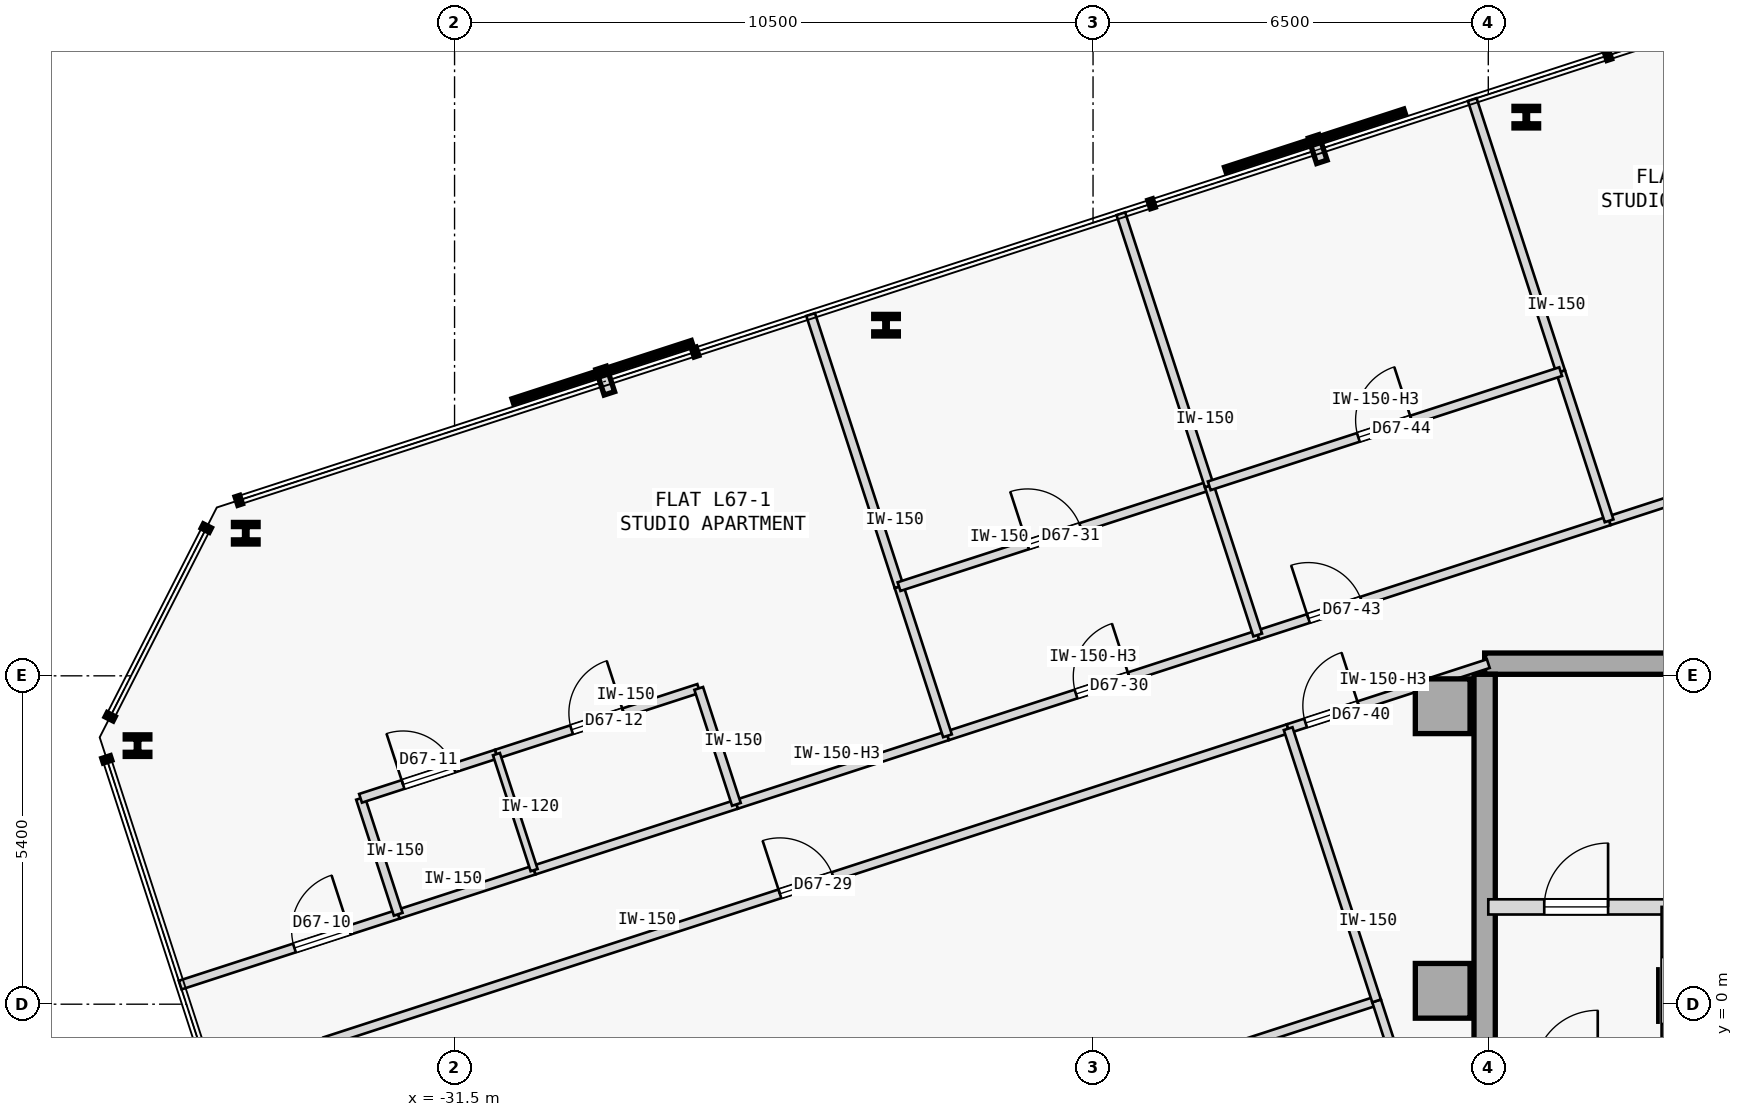
"""IFC4 building model, lengths in metres.
Left out: names, types, materials, properties, quantities, classifications, styles, units other than length and angle.
Written with IfcOpenShell. Run it as: python <this file> out.ifc"""

import sys

from ifc_helpers import new_model, si_unit, direction, frame, frame_2d, origin, origin_2d, place, context, subcontext, project, spatial, rectangle, i_section, extrude, element, fill, save


model = new_model("IFC4")
c1 = context("Model", 3, precision=1e-05, world=origin(), true_north=direction((0.0, 1.0)))
c2 = subcontext(c1, "Body", "Model", "MODEL_VIEW")
j1 = project(units=[si_unit("LENGTHUNIT", "METRE"), si_unit("PLANEANGLEUNIT", "RADIAN")], contexts=[c1])
p1 = place(None, origin())
s1 = spatial("IfcSite", under=j1, at=p1, CompositionType="ELEMENT")
p2 = place(p1, origin())
s2 = spatial("IfcBuilding", under=s1, at=p2, CompositionType="ELEMENT")
p3 = place(p2, frame((0.0, 0.0, 251.1)))
s3 = spatial("IfcBuildingStorey", under=s2, at=p3, CompositionType="ELEMENT", Elevation=251.1)
for number, where, z_axis, x_axis in (
    (1, (-15.25, 4.9, 0.0), (0.0, 0.0, 1.0), (1.0, 0.0, 0.0)),
    (2, (-15.25, 0.22, 0.0), (0.0, 0.0, 1.0), (1.0, 0.0, 0.0)),
):
    element("IfcColumn", number, at=place(p3, frame(where, z_axis=z_axis, x_axis=x_axis)), inside=s3, PredefinedType="COLUMN", context=c2, shape_type="SweptSolid", body=[
        extrude(rectangle(XDim=0.9, YDim=0.9, at=origin_2d()), origin(), (0.0, 0.0, 1.0), 3.35),
    ])
p4 = place(p3, frame((-14.56, 5.6, 0.0), z_axis=(0.0, 0.0, 1.0), x_axis=(1.0, 0.0, 0.0)))
e3 = element("IfcWall", 3, at=p4, inside=s3, PredefinedType="SHEAR", context=c2, shape_type="SweptSolid", body=[
    extrude(rectangle(XDim=11.41, YDim=0.35, at=frame_2d((5.705, 0.0))), origin(), (0.0, 0.0, 1.0), 2.95),
])
p5 = place(p3, frame((-14.56, -5.425, 0.0), z_axis=(0.0, 0.0, 1.0), x_axis=(0.0, 1.0, 0.0)))
e4 = element("IfcWall", 4, at=p5, inside=s3, PredefinedType="SHEAR", context=c2, shape_type="SweptSolid", body=[
    extrude(rectangle(XDim=10.85, YDim=0.35, at=frame_2d((5.425, 0.0))), origin(), (0.0, 0.0, 1.0), 2.95),
])
for number, where, z_axis, x_axis in (
    (5, (-13.875, 14.587, 0.0), (0.0, 0.0, 1.0), (1.0, 0.0, 0.0)),
    (6, (-24.404, 11.166, 0.0), (0.0, 0.0, 1.0), (1.0, 0.0, 0.0)),
    (7, (-34.934, 7.745, 0.0), (0.0, 0.0, 1.0), (1.0, 0.0, 0.0)),
    (8, (-36.713, 4.252, 0.0), (0.0, 0.0, 1.0), (1.0, 0.0, 0.0)),
):
    element("IfcColumn", number, at=place(p3, frame(where, z_axis=z_axis, x_axis=x_axis)), inside=s3, PredefinedType="COLUMN", context=c2, shape_type="SweptSolid", body=[
        extrude(i_section(OverallWidth=0.405, OverallDepth=0.355, WebThickness=0.042, FlangeThickness=0.068, FilletRadius=0.015, at=origin_2d()), origin(), (0.0, 0.0, 1.0), 3.35),
    ])
p6 = place(p3, frame((-14.5, 1.6, 0.0), z_axis=(0.0, 0.0, 1.0), x_axis=(1.0, 0.0, 0.0)))
e9 = element("IfcWall", 9, at=p6, inside=s3, PredefinedType="STANDARD", context=c2, shape_type="SweptSolid", body=[
    extrude(rectangle(XDim=3.6, YDim=0.25, at=frame_2d((1.8, 0.0))), origin(), (0.0, 0.0, 1.0), 2.95),
])
p7 = place(p6, frame((0.92, 0.0, 0.0)))
e10 = element("IfcOpeningElement", 10, at=p7, cuts=e9, PredefinedType="OPENING", context=c2, shape_type="SweptSolid", body=[
    extrude(rectangle(XDim=1.05, YDim=2.15, at=frame_2d((0.525, 1.075))), frame((0.0, 0.135, 0.0), z_axis=(0.0, -1.0, 0.0), x_axis=(1.0, 0.0, 0.0)), (0.0, 0.0, 1.0), 0.27),
])
p8 = place(p3, frame((-11.55, -1.15, 0.0), z_axis=(0.0, 0.0, 1.0), x_axis=(0.0, 1.0, 0.0)))
e11 = element("IfcWall", 11, at=p8, inside=s3, PredefinedType="STANDARD", context=c2, shape_type="SweptSolid", body=[
    extrude(rectangle(XDim=2.75, YDim=0.2, at=frame_2d((1.375, 0.0))), origin(), (0.0, 0.0, 1.0), 2.95),
])
p9 = place(p8, frame((0.825, 0.0, 0.0)))
e12 = element("IfcOpeningElement", 12, at=p9, cuts=e11, PredefinedType="OPENING", context=c2, shape_type="SweptSolid", body=[
    extrude(rectangle(XDim=1.1, YDim=2.15, at=frame_2d((0.55, 1.075))), frame((0.0, 0.11, 0.0), z_axis=(0.0, -1.0, 0.0), x_axis=(1.0, 0.0, 0.0)), (0.0, 0.0, 1.0), 0.22),
])
p10 = place(p3, frame((-36.012, 0.314, 0.0), z_axis=(0.0, 0.0, 1.0), x_axis=(0.951071182868, 0.308971851659, 0.0)))
e13 = element("IfcWall", 13, at=p10, inside=s3, PredefinedType="PARTITIONING", context=c2, shape_type="SweptSolid", body=[
    extrude(rectangle(XDim=3.77, YDim=0.15, at=frame_2d((1.885, 0.0))), origin(), (0.0, 0.0, 1.0), 2.95),
])
p11 = place(p10, frame((1.976, 0.0, 0.0)))
e14 = element("IfcOpeningElement", 14, at=p11, cuts=e13, PredefinedType="OPENING", context=c2, shape_type="SweptSolid", body=[
    extrude(rectangle(XDim=0.95, YDim=2.15, at=frame_2d((0.475, 1.075))), frame((0.0, 0.085, 0.0), z_axis=(0.0, -1.0, 0.0), x_axis=(1.0, 0.0, 0.0)), (0.0, 0.0, 1.0), 0.17),
])
p12 = place(p3, frame((-26.865, 3.286, 0.0), z_axis=(0.0, 0.0, 1.0), x_axis=(0.951057168147, 0.309014988174, 0.0)))
e15 = element("IfcWall", 15, at=p12, inside=s3, PredefinedType="PARTITIONING", context=c2, shape_type="SweptSolid", body=[
    extrude(rectangle(XDim=3.65, YDim=0.15, at=frame_2d((1.825, 0.0))), origin(), (0.0, 0.0, 1.0), 2.17),
])
p13 = place(p3, frame((-32.427, 1.479, 0.0), z_axis=(0.0, 0.0, 1.0), x_axis=(0.951045519245, 0.309050837767, 0.0)))
e16 = element("IfcWall", 16, at=p13, inside=s3, PredefinedType="PARTITIONING", context=c2, shape_type="SweptSolid", body=[
    extrude(rectangle(XDim=2.35, YDim=0.15, at=frame_2d((1.175, 0.0))), origin(), (0.0, 0.0, 1.0), 2.95),
])
p14 = place(p3, frame((-30.192, 2.205, 0.0), z_axis=(0.0, 0.0, 1.0), x_axis=(0.951063814176, 0.308994532905, 0.0)))
e17 = element("IfcWall", 17, at=p14, inside=s3, PredefinedType="PARTITIONING", context=c2, shape_type="SweptSolid", body=[
    extrude(rectangle(XDim=3.498, YDim=0.15, at=frame_2d((1.749, 0.0))), origin(), (0.0, 0.0, 1.0), 2.95),
])
p15 = place(p3, frame((-12.513, 7.949, 0.0), z_axis=(0.0, 0.0, 1.0), x_axis=(0.951050780541, 0.309034646652, 0.0)))
e18 = element("IfcWall", 18, at=p15, inside=s3, PredefinedType="PARTITIONING", context=c2, shape_type="SweptSolid", body=[
    extrude(rectangle(XDim=3.65, YDim=0.15, at=frame_2d((1.825, 0.0))), origin(), (0.0, 0.0, 1.0), 2.95),
])
p16 = place(p3, frame((-33.633, -0.616, 0.0), z_axis=(0.0, 0.0, 1.0), x_axis=(0.951058192995, 0.309011833974, 0.0)))
e19 = element("IfcWall", 19, at=p16, inside=s3, PredefinedType="PARTITIONING", context=c2, shape_type="SweptSolid", body=[
    extrude(rectangle(XDim=16.657, YDim=0.15, at=frame_2d((8.329, 0.0))), origin(), (0.0, 0.0, 1.0), 2.95),
])
p17 = place(p16, frame((7.868, 0.0, 0.0)))
e20 = element("IfcOpeningElement", 20, at=p17, cuts=e19, PredefinedType="OPENING", context=c2, shape_type="SweptSolid", body=[
    extrude(rectangle(XDim=0.92, YDim=2.15, at=frame_2d((0.46, 1.075))), frame((0.0, 0.085, 0.0), z_axis=(0.0, -1.0, 0.0), x_axis=(1.0, 0.0, 0.0)), (0.0, 0.0, 1.0), 0.17),
])
p18 = place(p3, frame((-23.394, 4.414, 0.0), z_axis=(0.0, 0.0, 1.0), x_axis=(0.951050121956, 0.309036673434, 0.0)))
e21 = element("IfcWall", 21, at=p18, inside=s3, PredefinedType="PARTITIONING", context=c2, shape_type="SweptSolid", body=[
    extrude(rectangle(XDim=5.364, YDim=0.15, at=frame_2d((2.682, 0.0))), origin(), (0.0, 0.0, 1.0), 2.17),
])
p19 = place(p18, frame((2.222, 0.0, 0.0)))
e22 = element("IfcOpeningElement", 22, at=p19, cuts=e21, PredefinedType="OPENING", context=c2, shape_type="SweptSolid", body=[
    extrude(rectangle(XDim=0.92, YDim=2.15, at=frame_2d((0.46, 1.075))), frame((0.0, 0.085, 0.0), z_axis=(0.0, -1.0, 0.0), x_axis=(1.0, 0.0, 0.0)), (0.0, 0.0, 1.0), 0.17),
])
p20 = place(p3, frame((-17.792, 4.531, 0.0), z_axis=(0.0, 0.0, 1.0), x_axis=(0.951047546178, 0.309044600193, 0.0)))
e23 = element("IfcWall", 23, at=p20, inside=s3, PredefinedType="PARTITIONING", context=c2, shape_type="SweptSolid", body=[
    extrude(rectangle(XDim=3.461, YDim=0.15, at=frame_2d((1.73, 0.0))), origin(), (0.0, 0.0, 1.0), 2.17),
])
p21 = place(p20, frame((0.302, 0.0, 0.0)))
e24 = element("IfcOpeningElement", 24, at=p21, cuts=e23, PredefinedType="OPENING", context=c2, shape_type="SweptSolid", body=[
    extrude(rectangle(XDim=0.92, YDim=2.15, at=frame_2d((0.46, 1.075))), frame((0.0, 0.085, 0.0), z_axis=(0.0, -1.0, 0.0), x_axis=(1.0, 0.0, 0.0)), (0.0, 0.0, 1.0), 0.17),
])
p22 = place(p3, frame((-18.292, 6.072, 0.0), z_axis=(0.0, 0.0, 1.0), x_axis=(0.951062707515, 0.30899793911, 0.0)))
e25 = element("IfcWall", 25, at=p22, inside=s3, PredefinedType="PARTITIONING", context=c2, shape_type="SweptSolid", body=[
    extrude(rectangle(XDim=6.076, YDim=0.15, at=frame_2d((3.038, 0.0))), origin(), (0.0, 0.0, 1.0), 2.95),
])
p23 = place(p22, frame((0.877, 0.0, 0.0)))
e26 = element("IfcOpeningElement", 26, at=p23, cuts=e25, PredefinedType="OPENING", context=c2, shape_type="SweptSolid", body=[
    extrude(rectangle(XDim=0.92, YDim=2.15, at=frame_2d((0.46, 1.075))), frame((0.0, 0.085, 0.0), z_axis=(0.0, -1.0, 0.0), x_axis=(1.0, 0.0, 0.0)), (0.0, 0.0, 1.0), 0.17),
])
p24 = place(p3, frame((-32.427, 1.479, 0.0), z_axis=(0.0, 0.0, 1.0), x_axis=(-0.309022749039, 0.951054646472, 0.0)))
e27 = element("IfcWall", 27, at=p24, inside=s3, PredefinedType="PARTITIONING", context=c2, shape_type="SweptSolid", body=[
    extrude(rectangle(XDim=2.005, YDim=0.15, at=frame_2d((1.002, 0.0))), origin(), (0.0, 0.0, 1.0), 2.95),
])
p25 = place(p3, frame((-33.046, 3.386, 0.0), z_axis=(0.0, 0.0, 1.0), x_axis=(0.951045519245, 0.309050837767, 0.0)))
e28 = element("IfcWall", 28, at=p25, inside=s3, PredefinedType="PARTITIONING", context=c2, shape_type="SweptSolid", body=[
    extrude(rectangle(XDim=2.35, YDim=0.15, at=frame_2d((1.175, 0.0))), origin(), (0.0, 0.0, 1.0), 2.95),
])
p26 = place(p25, frame((0.735, 0.0, 0.0)))
e29 = element("IfcOpeningElement", 29, at=p26, cuts=e28, PredefinedType="OPENING", context=c2, shape_type="SweptSolid", body=[
    extrude(rectangle(XDim=0.88, YDim=2.15, at=frame_2d((0.44, 1.075))), frame((0.0, 0.085, 0.0), z_axis=(0.0, -1.0, 0.0), x_axis=(1.0, 0.0, 0.0)), (0.0, 0.0, 1.0), 0.17),
])
p27 = place(p3, frame((-30.811, 4.112, 0.0), z_axis=(0.0, 0.0, 1.0), x_axis=(0.951063814176, 0.308994532905, 0.0)))
e30 = element("IfcWall", 30, at=p27, inside=s3, PredefinedType="PARTITIONING", context=c2, shape_type="SweptSolid", body=[
    extrude(rectangle(XDim=3.498, YDim=0.15, at=frame_2d((1.749, 0.0))), origin(), (0.0, 0.0, 1.0), 2.95),
])
p28 = place(p27, frame((1.299, 0.0, 0.0)))
e31 = element("IfcOpeningElement", 31, at=p28, cuts=e30, PredefinedType="OPENING", context=c2, shape_type="SweptSolid", body=[
    extrude(rectangle(XDim=0.9, YDim=2.15, at=frame_2d((0.45, 1.075))), frame((0.0, 0.085, 0.0), z_axis=(0.0, -1.0, 0.0), x_axis=(1.0, 0.0, 0.0)), (0.0, 0.0, 1.0), 0.17),
])
p29 = place(p3, frame((-26.865, 3.286, 0.0), z_axis=(0.0, 0.0, 1.0), x_axis=(-0.309022749039, 0.951054646472, 0.0)))
e32 = element("IfcWall", 32, at=p29, inside=s3, PredefinedType="PARTITIONING", context=c2, shape_type="SweptSolid", body=[
    extrude(rectangle(XDim=2.005, YDim=0.15, at=frame_2d((1.002, 0.0))), origin(), (0.0, 0.0, 1.0), 2.95),
])
p30 = place(p3, frame((-23.394, 4.414, 0.0), z_axis=(0.0, 0.0, 1.0), x_axis=(-0.308976906612, 0.951069540665, 0.0)))
e33 = element("IfcWall", 33, at=p30, inside=s3, PredefinedType="PARTITIONING", context=c2, shape_type="SweptSolid", body=[
    extrude(rectangle(XDim=2.579, YDim=0.15, at=frame_2d((1.29, 0.0))), origin(), (0.0, 0.0, 1.0), 2.95),
])
p31 = place(p3, frame((-24.19, 6.867, 0.0), z_axis=(0.0, 0.0, 1.0), x_axis=(-0.309057912466, 0.951043220228, 0.0)))
e34 = element("IfcWall", 34, at=p31, inside=s3, PredefinedType="PARTITIONING", context=c2, shape_type="SweptSolid", body=[
    extrude(rectangle(XDim=4.705, YDim=0.15, at=frame_2d((2.353, 0.0))), origin(), (0.0, 0.0, 1.0), 2.95),
])
p32 = place(p3, frame((-30.192, 2.205, 0.0), z_axis=(0.0, 0.0, 1.0), x_axis=(-0.309022749039, 0.951054646472, 0.0)))
e35 = element("IfcWall", 35, at=p32, inside=s3, PredefinedType="PARTITIONING", context=c2, shape_type="SweptSolid", body=[
    extrude(rectangle(XDim=2.005, YDim=0.12, at=frame_2d((1.002, 0.0))), origin(), (0.0, 0.0, 1.0), 2.95),
])
p33 = place(p3, frame((-12.513, 7.949, 0.0), z_axis=(0.0, 0.0, 1.0), x_axis=(-0.309062527822, 0.951041720376, 0.0)))
e36 = element("IfcWall", 36, at=p33, inside=s3, PredefinedType="PARTITIONING", context=c2, shape_type="SweptSolid", body=[
    extrude(rectangle(XDim=2.579, YDim=0.15, at=frame_2d((1.29, 0.0))), origin(), (0.0, 0.0, 1.0), 2.95),
])
p34 = place(p3, frame((-13.311, 10.402, 0.0), z_axis=(0.0, 0.0, 1.0), x_axis=(-0.309010977541, 0.951058471262, 0.0)))
e37 = element("IfcWall", 37, at=p34, inside=s3, PredefinedType="PARTITIONING", context=c2, shape_type="SweptSolid", body=[
    extrude(rectangle(XDim=4.705, YDim=0.15, at=frame_2d((2.353, 0.0))), origin(), (0.0, 0.0, 1.0), 2.95),
])
p35 = place(p3, frame((-32.179, -5.093, 0.0), z_axis=(0.0, 0.0, 1.0), x_axis=(0.951053885426, 0.309025091239, 0.0)))
e38 = element("IfcWall", 38, at=p35, inside=s3, PredefinedType="PARTITIONING", context=c2, shape_type="SweptSolid", body=[
    extrude(rectangle(XDim=16.657, YDim=0.15, at=frame_2d((8.329, 0.0))), origin(), (0.0, 0.0, 1.0), 2.95),
])
p36 = place(p3, frame((-15.685, -1.952, 0.0), z_axis=(0.0, 0.0, 1.0), x_axis=(-0.308929092959, 0.951085072706, 0.0)))
e39 = element("IfcWall", 39, at=p36, inside=s3, PredefinedType="PARTITIONING", context=c2, shape_type="SweptSolid", body=[
    extrude(rectangle(XDim=2.11, YDim=0.15, at=frame_2d((1.055, 0.0))), origin(), (0.0, 0.0, 1.0), 2.95),
])
p37 = place(p3, frame((-16.337, 0.054, 0.0), z_axis=(0.0, 0.0, 1.0), x_axis=(-0.309029776355, 0.951052363083, 0.0)))
e40 = element("IfcWall", 40, at=p37, inside=s3, PredefinedType="PARTITIONING", context=c2, shape_type="SweptSolid", body=[
    extrude(rectangle(XDim=4.707, YDim=0.15, at=frame_2d((2.354, 0.0))), origin(), (0.0, 0.0, 1.0), 2.95),
])
p38 = place(p3, frame((-24.19, 6.867, 0.0), z_axis=(0.0, 0.0, 1.0), x_axis=(0.951059152206, 0.309008881758, 0.0)))
e41 = element("IfcWall", 41, at=p38, inside=s3, PredefinedType="PARTITIONING", context=c2, shape_type="SweptSolid", body=[
    extrude(rectangle(XDim=5.364, YDim=0.15, at=frame_2d((2.682, 0.0))), origin(), (0.0, 0.0, 1.0), 2.95),
])
p39 = place(p38, frame((2.222, 0.0, 0.0)))
e42 = element("IfcOpeningElement", 42, at=p39, cuts=e41, PredefinedType="OPENING", context=c2, shape_type="SweptSolid", body=[
    extrude(rectangle(XDim=0.92, YDim=2.15, at=frame_2d((0.46, 1.075))), frame((0.0, 0.085, 0.0), z_axis=(0.0, -1.0, 0.0), x_axis=(1.0, 0.0, 0.0)), (0.0, 0.0, 1.0), 0.17),
])
p40 = place(p3, frame((-18.292, 6.072, 0.0), z_axis=(0.0, 0.0, 1.0), x_axis=(-0.309090353524, 0.951032677335, 0.0)))
e43 = element("IfcWall", 43, at=p40, inside=s3, PredefinedType="PARTITIONING", context=c2, shape_type="SweptSolid", body=[
    extrude(rectangle(XDim=2.579, YDim=0.15, at=frame_2d((1.29, 0.0))), origin(), (0.0, 0.0, 1.0), 2.95),
])
p41 = place(p3, frame((-19.089, 8.524, 0.0), z_axis=(0.0, 0.0, 1.0), x_axis=(-0.308995728133, 0.951063425853, 0.0)))
e44 = element("IfcWall", 44, at=p41, inside=s3, PredefinedType="PARTITIONING", context=c2, shape_type="SweptSolid", body=[
    extrude(rectangle(XDim=4.705, YDim=0.15, at=frame_2d((2.353, 0.0))), origin(), (0.0, 0.0, 1.0), 2.95),
])
p42 = place(p3, frame((-19.089, 8.524, 0.0), z_axis=(0.0, 0.0, 1.0), x_axis=(0.951050898488, 0.309034283674, 0.0)))
e45 = element("IfcWall", 45, at=p42, inside=s3, PredefinedType="PARTITIONING", context=c2, shape_type="SweptSolid", body=[
    extrude(rectangle(XDim=6.076, YDim=0.15, at=frame_2d((3.038, 0.0))), origin(), (0.0, 0.0, 1.0), 2.17),
])
p43 = place(p42, frame((2.578, 0.0, 0.0)))
e46 = element("IfcOpeningElement", 46, at=p43, cuts=e45, PredefinedType="OPENING", context=c2, shape_type="SweptSolid", body=[
    extrude(rectangle(XDim=0.92, YDim=2.15, at=frame_2d((0.46, 1.075))), frame((0.0, 0.085, 0.0), z_axis=(0.0, -1.0, 0.0), x_axis=(1.0, 0.0, 0.0)), (0.0, 0.0, 1.0), 0.17),
])
p44 = place(p7, origin())
e47 = element("IfcDoor", 47, at=p44, inside=s3, OperationType="SINGLE_SWING_RIGHT", PredefinedType="DOOR", context=c2, shape_type="SweptSolid", body=[
    extrude(rectangle(XDim=1.05, YDim=2.15, at=frame_2d((0.525, 1.075))), frame((0.0, 0.025, 0.0), z_axis=(0.0, -1.0, 0.0), x_axis=(1.0, 0.0, 0.0)), (0.0, 0.0, 1.0), 0.05),
])
fill(e10, e47)
p45 = place(p11, origin())
e48 = element("IfcDoor", 48, at=p45, inside=s3, OperationType="SINGLE_SWING_RIGHT", PredefinedType="DOOR", context=c2, shape_type="SweptSolid", body=[
    extrude(rectangle(XDim=0.95, YDim=2.15, at=frame_2d((0.475, 1.075))), frame((0.0, 0.025, 0.0), z_axis=(0.0, -1.0, 0.0), x_axis=(1.0, 0.0, 0.0)), (0.0, 0.0, 1.0), 0.05),
])
fill(e14, e48)
p46 = place(p26, origin())
e49 = element("IfcDoor", 49, at=p46, inside=s3, OperationType="SINGLE_SWING_LEFT", PredefinedType="DOOR", context=c2, shape_type="SweptSolid", body=[
    extrude(rectangle(XDim=0.88, YDim=2.15, at=frame_2d((0.44, 1.075))), frame((0.0, 0.025, 0.0), z_axis=(0.0, -1.0, 0.0), x_axis=(1.0, 0.0, 0.0)), (0.0, 0.0, 1.0), 0.05),
])
fill(e29, e49)
p47 = place(p28, origin())
e50 = element("IfcDoor", 50, at=p47, inside=s3, OperationType="SINGLE_SWING_RIGHT", PredefinedType="DOOR", context=c2, shape_type="SweptSolid", body=[
    extrude(rectangle(XDim=0.9, YDim=2.15, at=frame_2d((0.45, 1.075))), frame((0.0, 0.025, 0.0), z_axis=(0.0, -1.0, 0.0), x_axis=(1.0, 0.0, 0.0)), (0.0, 0.0, 1.0), 0.05),
])
fill(e31, e50)
p48 = place(p17, origin())
e51 = element("IfcDoor", 51, at=p48, inside=s3, OperationType="SINGLE_SWING_LEFT", PredefinedType="DOOR", context=c2, shape_type="SweptSolid", body=[
    extrude(rectangle(XDim=0.92, YDim=2.15, at=frame_2d((0.46, 1.075))), frame((0.0, 0.025, 0.0), z_axis=(0.0, -1.0, 0.0), x_axis=(1.0, 0.0, 0.0)), (0.0, 0.0, 1.0), 0.05),
])
fill(e20, e51)
p49 = place(p19, origin())
e52 = element("IfcDoor", 52, at=p49, inside=s3, OperationType="SINGLE_SWING_RIGHT", PredefinedType="DOOR", context=c2, shape_type="SweptSolid", body=[
    extrude(rectangle(XDim=0.92, YDim=2.15, at=frame_2d((0.46, 1.075))), frame((0.0, 0.025, 0.0), z_axis=(0.0, -1.0, 0.0), x_axis=(1.0, 0.0, 0.0)), (0.0, 0.0, 1.0), 0.05),
])
fill(e22, e52)
p50 = place(p39, origin())
e53 = element("IfcDoor", 53, at=p50, inside=s3, OperationType="SINGLE_SWING_LEFT", PredefinedType="DOOR", context=c2, shape_type="SweptSolid", body=[
    extrude(rectangle(XDim=0.92, YDim=2.15, at=frame_2d((0.46, 1.075))), frame((0.0, 0.025, 0.0), z_axis=(0.0, -1.0, 0.0), x_axis=(1.0, 0.0, 0.0)), (0.0, 0.0, 1.0), 0.05),
])
fill(e42, e53)
p51 = place(p21, origin())
e54 = element("IfcDoor", 54, at=p51, inside=s3, OperationType="SINGLE_SWING_RIGHT", PredefinedType="DOOR", context=c2, shape_type="SweptSolid", body=[
    extrude(rectangle(XDim=0.92, YDim=2.15, at=frame_2d((0.46, 1.075))), frame((0.0, 0.025, 0.0), z_axis=(0.0, -1.0, 0.0), x_axis=(1.0, 0.0, 0.0)), (0.0, 0.0, 1.0), 0.05),
])
fill(e24, e54)
p52 = place(p23, origin())
e55 = element("IfcDoor", 55, at=p52, inside=s3, OperationType="SINGLE_SWING_LEFT", PredefinedType="DOOR", context=c2, shape_type="SweptSolid", body=[
    extrude(rectangle(XDim=0.92, YDim=2.15, at=frame_2d((0.46, 1.075))), frame((0.0, 0.025, 0.0), z_axis=(0.0, -1.0, 0.0), x_axis=(1.0, 0.0, 0.0)), (0.0, 0.0, 1.0), 0.05),
])
fill(e26, e55)
p53 = place(p43, origin())
e56 = element("IfcDoor", 56, at=p53, inside=s3, OperationType="SINGLE_SWING_RIGHT", PredefinedType="DOOR", context=c2, shape_type="SweptSolid", body=[
    extrude(rectangle(XDim=0.92, YDim=2.15, at=frame_2d((0.46, 1.075))), frame((0.0, 0.025, 0.0), z_axis=(0.0, -1.0, 0.0), x_axis=(1.0, 0.0, 0.0)), (0.0, 0.0, 1.0), 0.05),
])
fill(e46, e56)
save(model, sys.argv[1])
